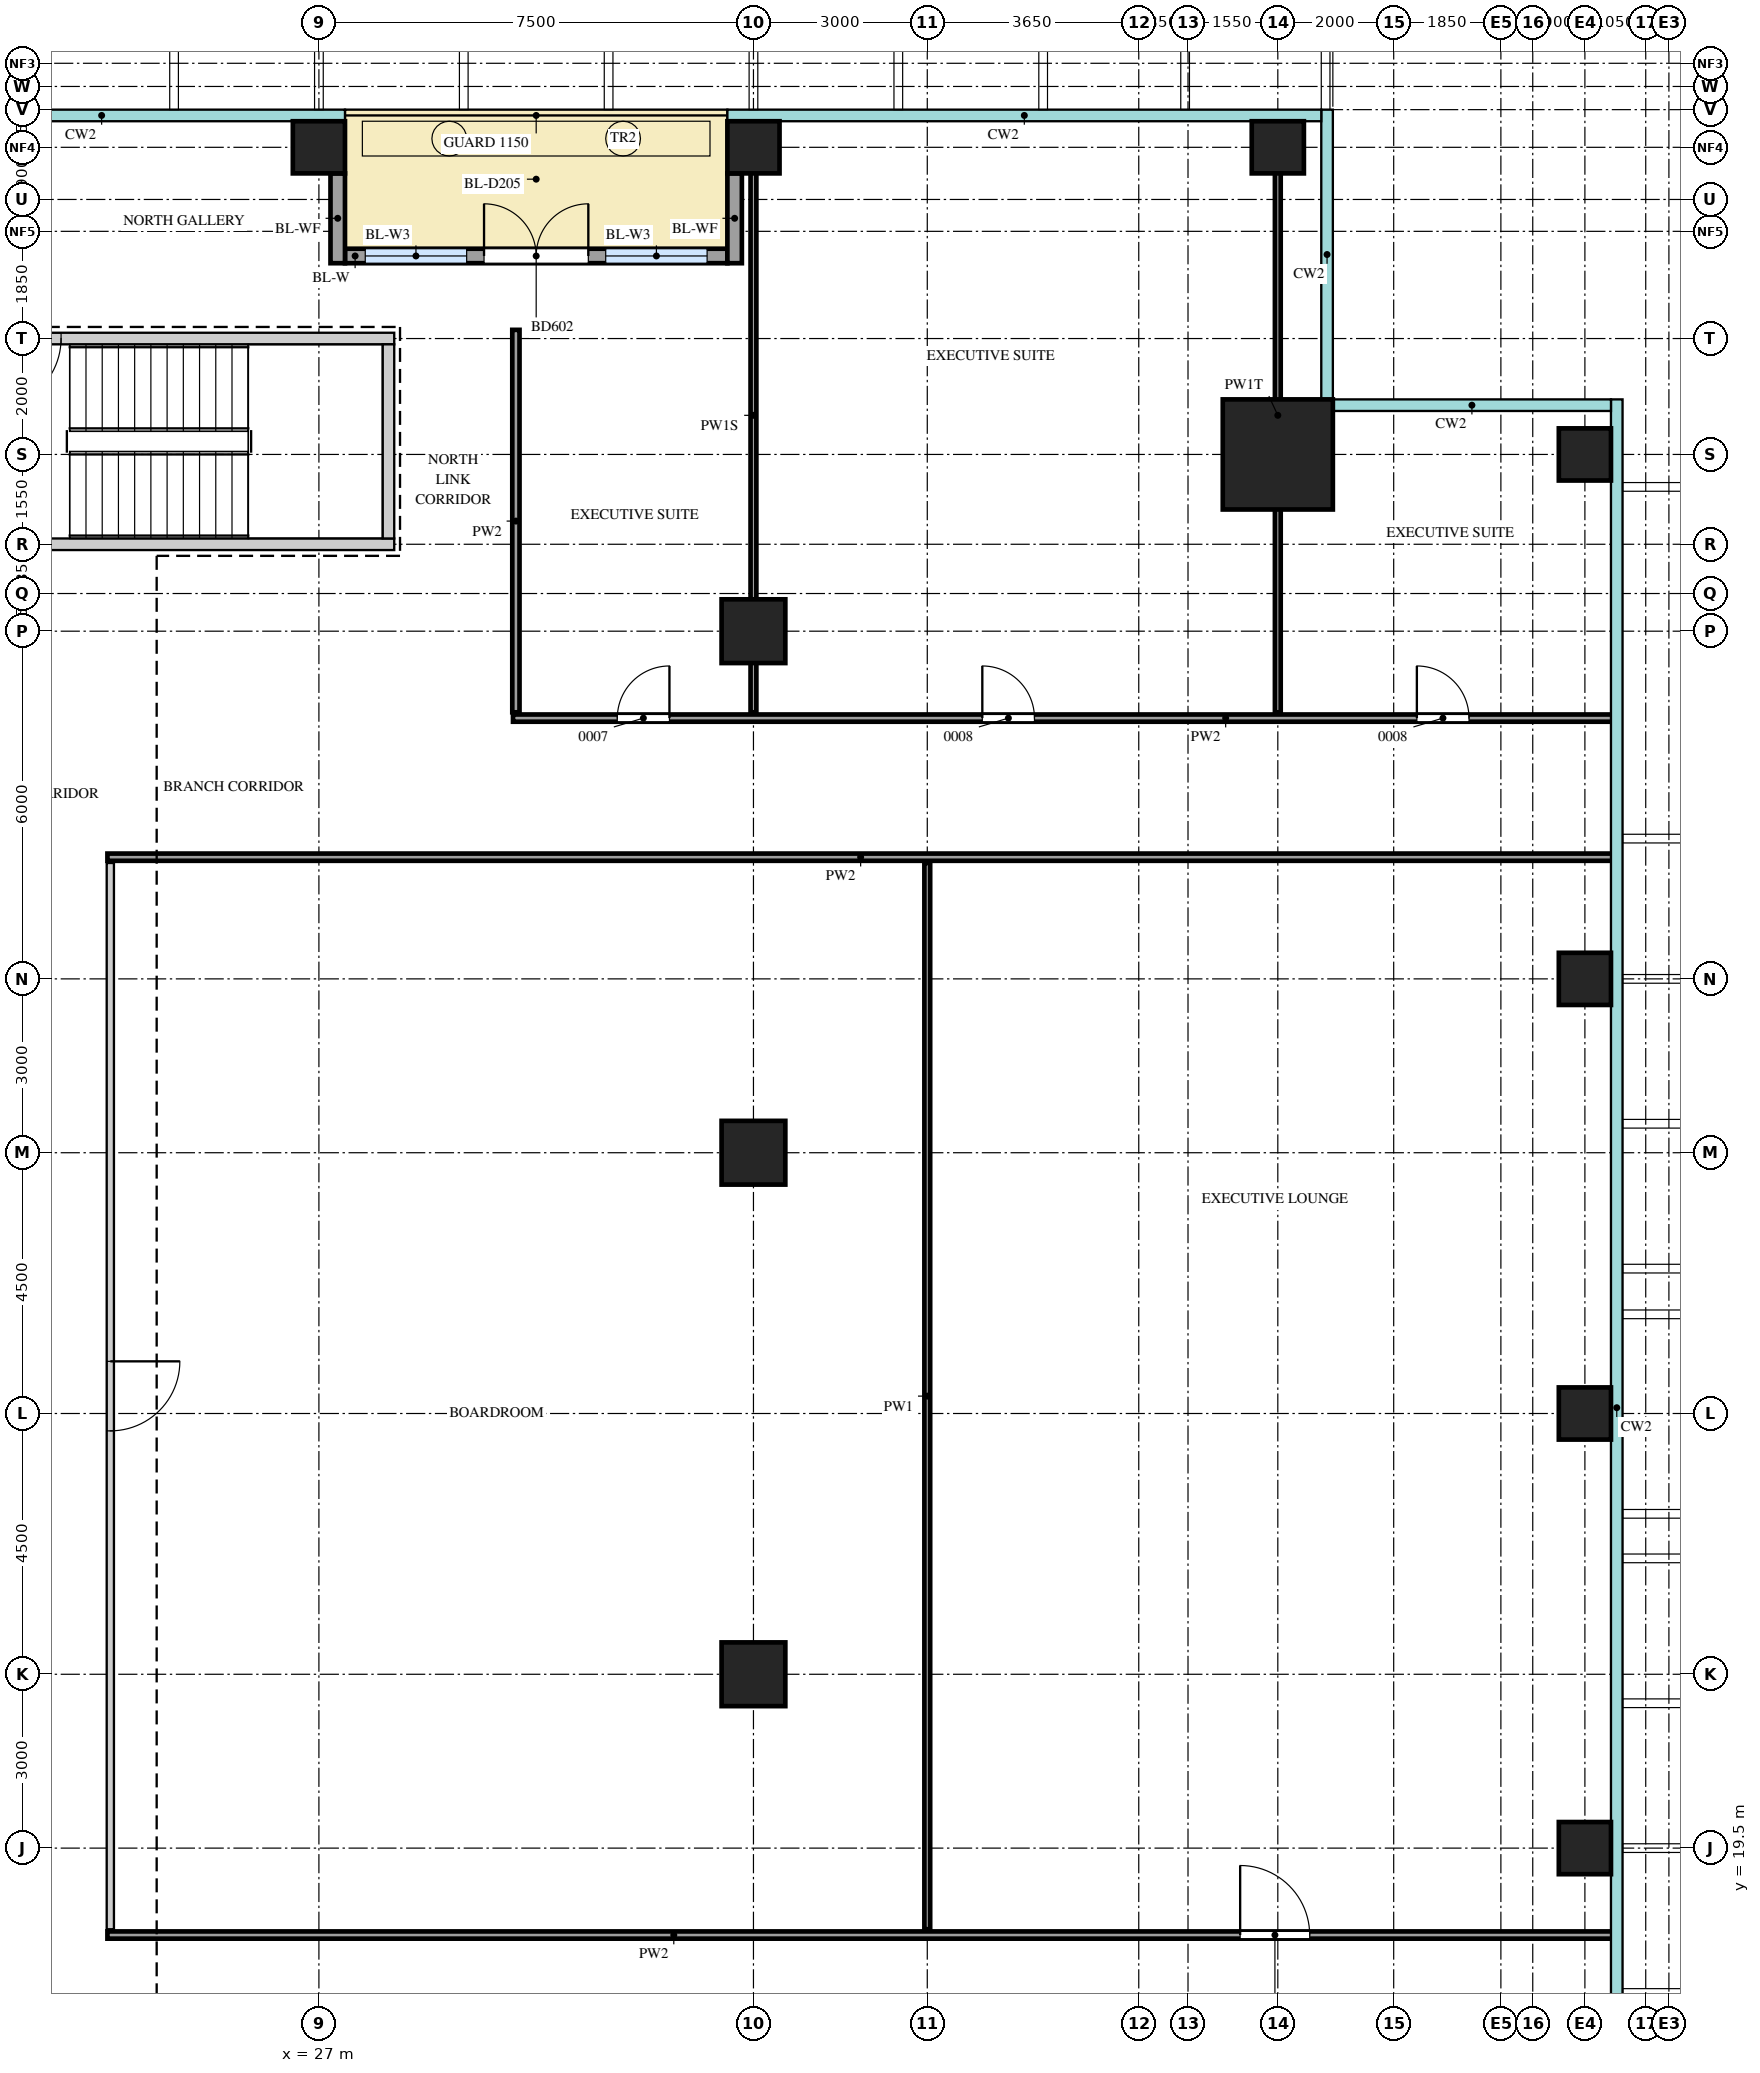
"""IFC4 building model, lengths in metres.
Left out: names, types, materials, properties, quantities, classifications, styles, units other than length and angle.
Written with IfcOpenShell. Run it as: python <this file> out.ifc"""

import sys

from ifc_helpers import new_model, si_unit, direction, frame, frame_2d, origin, origin_2d, place, context, subcontext, project, spatial, rectangle, extrude, source, transform, mapped, element, fill, save


model = new_model("IFC4")
c1 = context("Model", 3, precision=1e-05, world=origin(), true_north=direction((0.0, 1.0)))
c2 = subcontext(c1, "Body", "Model", "MODEL_VIEW")
j1 = project(units=[si_unit("LENGTHUNIT", "METRE"), si_unit("PLANEANGLEUNIT", "RADIAN")], contexts=[c1])
p1 = place(None, origin())
s1 = spatial("IfcSite", under=j1, at=p1, CompositionType="ELEMENT")
p2 = place(p1, origin())
s2 = spatial("IfcBuilding", under=s1, at=p2, CompositionType="ELEMENT")
p3 = place(p2, frame((0.0, 0.0, 266.2)))
s3 = spatial("IfcBuildingStorey", under=s2, at=p3, CompositionType="ELEMENT", Elevation=266.2)
m1 = source(origin(), c2, "Body", "SweptSolid", [
    extrude(rectangle(XDim=7.1, YDim=0.2, at=frame_2d((3.55, 0.0))), origin(), (0.0, 0.0, 1.0), 3.75),
])
p4 = place(p3, frame((21.2, 45.55, 0.0), z_axis=(0.0, 0.0, 1.0), x_axis=(1.0, 0.0, 0.0)))
e1 = element("IfcWall", 1, at=p4, inside=s3, PredefinedType="SHEAR", context=c2, shape_type="MappedRepresentation", body=[
    mapped(m1, transform((0.0, 0.0, 0.0))),
])
m2 = source(origin(), c2, "Body", "SweptSolid", [
    extrude(rectangle(XDim=1.2, YDim=2.1, at=frame_2d((0.6, 1.05))), frame((0.0, 0.11, 0.0), z_axis=(0.0, -1.0, 0.0), x_axis=(1.0, 0.0, 0.0)), (0.0, 0.0, 1.0), 0.22),
])
p5 = place(p4, frame((0.15, 0.0, 0.0)))
e2 = element("IfcOpeningElement", 2, at=p5, cuts=e1, PredefinedType="OPENING", context=c2, shape_type="MappedRepresentation", body=[
    mapped(m2, transform((0.0, 0.0, 0.0))),
])
p6 = place(p3, frame((21.2, 42.0, 0.0), z_axis=(0.0, 0.0, 1.0), x_axis=(1.0, 0.0, 0.0)))
e3 = element("IfcWall", 3, at=p6, inside=s3, PredefinedType="SHEAR", context=c2, shape_type="MappedRepresentation", body=[
    mapped(m1, transform((0.0, 0.0, 0.0))),
])
m3 = source(origin(), c2, "Body", "SweptSolid", [
    extrude(rectangle(XDim=3.35, YDim=0.2, at=frame_2d((1.675, 0.0))), origin(), (0.0, 0.0, 1.0), 3.75),
])
p7 = place(p3, frame((28.2, 42.1, 0.0), z_axis=(0.0, 0.0, 1.0), x_axis=(0.0, 1.0, 0.0)))
e4 = element("IfcWall", 4, at=p7, inside=s3, PredefinedType="SHEAR", context=c2, shape_type="MappedRepresentation", body=[
    mapped(m3, transform((0.0, 0.0, 0.0))),
])
m4 = source(origin(), c2, "Body", "SweptSolid", [
    extrude(rectangle(XDim=1.9, YDim=1.9, at=origin_2d()), origin(), (0.0, 0.0, 1.0), 4.0),
])
p8 = place(p3, frame((43.55, 43.55, 0.0), z_axis=(0.0, 0.0, 1.0), x_axis=(1.0, 0.0, 0.0)))
e5 = element("IfcColumn", 5, at=p8, inside=s3, PredefinedType="COLUMN", context=c2, shape_type="MappedRepresentation", body=[
    mapped(m4, transform((0.0, 0.0, 0.0))),
])
m5 = source(origin(), c2, "Body", "SweptSolid", [
    extrude(rectangle(XDim=0.9, YDim=0.9, at=origin_2d()), origin(), (0.0, 0.0, 1.0), 3.75),
])
for number, where, z_axis, x_axis in (
    (6, (48.85, 19.5, 0.0), (0.0, 0.0, 1.0), (1.0, 0.0, 0.0)),
    (7, (48.85, 27.0, 0.0), (0.0, 0.0, 1.0), (1.0, 0.0, 0.0)),
    (8, (48.85, 34.5, 0.0), (0.0, 0.0, 1.0), (1.0, 0.0, 0.0)),
    (9, (48.85, 43.55, 0.0), (0.0, 0.0, 1.0), (1.0, 0.0, 0.0)),
    (10, (27.0, 48.85, 0.0), (0.0, 0.0, 1.0), (1.0, 0.0, 0.0)),
    (11, (34.5, 48.85, 0.0), (0.0, 0.0, 1.0), (1.0, 0.0, 0.0)),
    (12, (43.55, 48.85, 0.0), (0.0, 0.0, 1.0), (1.0, 0.0, 0.0)),
):
    element("IfcColumn", number, at=place(p3, frame(where, z_axis=z_axis, x_axis=x_axis)), inside=s3, PredefinedType="COLUMN", context=c2, shape_type="MappedRepresentation", body=[
        mapped(m5, transform((0.0, 0.0, 0.0))),
    ])
m6 = source(origin(), c2, "Body", "SweptSolid", [
    extrude(rectangle(XDim=1.1, YDim=1.1, at=origin_2d()), origin(), (0.0, 0.0, 1.0), 3.75),
])
for number, where, z_axis, x_axis in (
    (13, (34.5, 22.5, 0.0), (0.0, 0.0, 1.0), (1.0, 0.0, 0.0)),
    (14, (34.5, 31.5, 0.0), (0.0, 0.0, 1.0), (1.0, 0.0, 0.0)),
    (15, (34.5, 40.5, 0.0), (0.0, 0.0, 1.0), (1.0, 0.0, 0.0)),
):
    element("IfcColumn", number, at=place(p3, frame(where, z_axis=z_axis, x_axis=x_axis)), inside=s3, PredefinedType="COLUMN", context=c2, shape_type="MappedRepresentation", body=[
        mapped(m6, transform((0.0, 0.0, 0.0))),
    ])
m7 = source(origin(), c2, "Body", "SweptSolid", [
    extrude(rectangle(XDim=6.6, YDim=0.25, at=frame_2d((3.3, 0.0))), origin(), (0.0, 0.0, 1.0), 3.75),
])
p9 = place(p3, frame((27.45, 46.975, 0.0), z_axis=(0.0, 0.0, 1.0), x_axis=(1.0, 0.0, 0.0)))
e16 = element("IfcWall", 16, at=p9, inside=s3, PredefinedType="SOLIDWALL", context=c2, shape_type="MappedRepresentation", body=[
    mapped(m7, transform((0.0, 0.0, 0.0))),
])
m8 = source(origin(), c2, "Body", "SweptSolid", [
    extrude(rectangle(XDim=1.75, YDim=2.4, at=frame_2d((0.875, 1.2))), frame((0.0, 0.135, 0.0), z_axis=(0.0, -1.0, 0.0), x_axis=(1.0, 0.0, 0.0)), (0.0, 0.0, 1.0), 0.27),
])
p10 = place(p9, frame((0.35, 0.0, 0.0)))
e17 = element("IfcOpeningElement", 17, at=p10, cuts=e16, PredefinedType="OPENING", context=c2, shape_type="MappedRepresentation", body=[
    mapped(m8, transform((0.0, 0.0, 0.0))),
])
p11 = place(p9, frame((4.5, 0.0, 0.0)))
e18 = element("IfcOpeningElement", 18, at=p11, cuts=e16, PredefinedType="OPENING", context=c2, shape_type="MappedRepresentation", body=[
    mapped(m8, transform((0.0, 0.0, 0.0))),
])
m9 = source(origin(), c2, "Body", "SweptSolid", [
    extrude(rectangle(XDim=1.8, YDim=2.4, at=frame_2d((0.9, 1.2))), frame((0.0, 0.135, 0.0), z_axis=(0.0, -1.0, 0.0), x_axis=(1.0, 0.0, 0.0)), (0.0, 0.0, 1.0), 0.27),
])
p12 = place(p9, frame((2.4, 0.0, 0.0)))
e19 = element("IfcOpeningElement", 19, at=p12, cuts=e16, PredefinedType="OPENING", context=c2, shape_type="MappedRepresentation", body=[
    mapped(m9, transform((0.0, 0.0, 0.0))),
])
m10 = source(origin(), c2, "Body", "SweptSolid", [
    extrude(rectangle(XDim=1.55, YDim=0.25, at=frame_2d((0.775, 0.0))), origin(), (0.0, 0.0, 1.0), 3.45),
])
for number, where, z_axis, x_axis in (
    (20, (27.325, 48.4, 0.0), (0.0, 0.0, 1.0), (0.0, -1.0, 0.0)),
    (21, (34.175, 48.4, 0.0), (0.0, 0.0, 1.0), (0.0, -1.0, 0.0)),
):
    element("IfcWall", number, at=place(p3, frame(where, z_axis=z_axis, x_axis=x_axis)), inside=s3, PredefinedType="SOLIDWALL", context=c2, shape_type="MappedRepresentation", body=[
        mapped(m10, transform((0.0, 0.0, 0.0))),
    ])
m11 = source(origin(), c2, "Body", "SweptSolid", [
    extrude(rectangle(XDim=26.0, YDim=0.125, at=frame_2d((13.0, 0.0))), origin(), (0.0, 0.0, 1.0), 3.8),
])
p13 = place(p3, frame((23.35, 18.0, 0.0), z_axis=(0.0, 0.0, 1.0), x_axis=(1.0, 0.0, 0.0)))
e22 = element("IfcWall", 22, at=p13, inside=s3, PredefinedType="PARTITIONING", context=c2, shape_type="MappedRepresentation", body=[
    mapped(m11, transform((0.0, 0.0, 0.0))),
])
m12 = source(origin(), c2, "Body", "SweptSolid", [
    extrude(rectangle(XDim=1.2, YDim=2.1, at=frame_2d((0.6, 1.05))), frame((0.0, 0.073, 0.0), z_axis=(0.0, -1.0, 0.0), x_axis=(1.0, 0.0, 0.0)), (0.0, 0.0, 1.0), 0.145),
])
p14 = place(p13, frame((19.55, 0.0, 0.0)))
e23 = element("IfcOpeningElement", 23, at=p14, cuts=e22, PredefinedType="OPENING", context=c2, shape_type="MappedRepresentation", body=[
    mapped(m12, transform((0.0, 0.0, 0.0))),
])
m13 = source(origin(), c2, "Body", "SweptSolid", [
    extrude(rectangle(XDim=18.4, YDim=0.125, at=frame_2d((9.2, 0.0))), origin(), (0.0, 0.0, 1.0), 3.8),
])
p15 = place(p3, frame((23.4, 18.1, 0.0), z_axis=(0.0, 0.0, 1.0), x_axis=(0.0, 1.0, 0.0)))
e24 = element("IfcWall", 24, at=p15, inside=s3, PredefinedType="PARTITIONING", context=c2, shape_type="MappedRepresentation", body=[
    mapped(m13, transform((0.0, 0.0, 0.0))),
])
p16 = place(p15, frame((8.6, 0.0, 0.0)))
e25 = element("IfcOpeningElement", 25, at=p16, cuts=e24, PredefinedType="OPENING", context=c2, shape_type="MappedRepresentation", body=[
    mapped(m12, transform((0.0, 0.0, 0.0))),
])
m14 = source(origin(), c2, "Body", "SweptSolid", [
    extrude(rectangle(XDim=18.4, YDim=0.1, at=frame_2d((9.2, 0.0))), origin(), (0.0, 0.0, 1.0), 3.8),
])
p17 = place(p3, frame((37.5, 18.1, 0.0), z_axis=(0.0, 0.0, 1.0), x_axis=(0.0, 1.0, 0.0)))
e26 = element("IfcWall", 26, at=p17, inside=s3, PredefinedType="PARTITIONING", context=c2, shape_type="MappedRepresentation", body=[
    mapped(m14, transform((0.0, 0.0, 0.0))),
])
p18 = place(p3, frame((23.35, 36.6, 0.0), z_axis=(0.0, 0.0, 1.0), x_axis=(1.0, 0.0, 0.0)))
e27 = element("IfcWall", 27, at=p18, inside=s3, PredefinedType="PARTITIONING", context=c2, shape_type="MappedRepresentation", body=[
    mapped(m11, transform((0.0, 0.0, 0.0))),
])
m15 = source(origin(), c2, "Body", "SweptSolid", [
    extrude(rectangle(XDim=19.0, YDim=0.125, at=frame_2d((9.5, 0.0))), origin(), (0.0, 0.0, 1.0), 3.8),
])
p19 = place(p3, frame((30.35, 39.0, 0.0), z_axis=(0.0, 0.0, 1.0), x_axis=(1.0, 0.0, 0.0)))
e28 = element("IfcWall", 28, at=p19, inside=s3, PredefinedType="PARTITIONING", context=c2, shape_type="MappedRepresentation", body=[
    mapped(m15, transform((0.0, 0.0, 0.0))),
])
m16 = source(origin(), c2, "Body", "SweptSolid", [
    extrude(rectangle(XDim=0.9, YDim=2.1, at=frame_2d((0.45, 1.05))), frame((0.0, 0.073, 0.0), z_axis=(0.0, -1.0, 0.0), x_axis=(1.0, 0.0, 0.0)), (0.0, 0.0, 1.0), 0.145),
])
p20 = place(p19, frame((1.8, 0.0, 0.0)))
e29 = element("IfcOpeningElement", 29, at=p20, cuts=e28, PredefinedType="OPENING", context=c2, shape_type="MappedRepresentation", body=[
    mapped(m16, transform((0.0, 0.0, 0.0))),
])
p21 = place(p19, frame((8.1, 0.0, 0.0)))
e30 = element("IfcOpeningElement", 30, at=p21, cuts=e28, PredefinedType="OPENING", context=c2, shape_type="MappedRepresentation", body=[
    mapped(m16, transform((0.0, 0.0, 0.0))),
])
p22 = place(p19, frame((15.6, 0.0, 0.0)))
e31 = element("IfcOpeningElement", 31, at=p22, cuts=e28, PredefinedType="OPENING", context=c2, shape_type="MappedRepresentation", body=[
    mapped(m16, transform((0.0, 0.0, 0.0))),
])
m17 = source(origin(), c2, "Body", "SweptSolid", [
    extrude(rectangle(XDim=6.6, YDim=0.125, at=frame_2d((3.3, 0.0))), origin(), (0.0, 0.0, 1.0), 3.8),
])
p23 = place(p3, frame((30.4, 39.1, 0.0), z_axis=(0.0, 0.0, 1.0), x_axis=(0.0, 1.0, 0.0)))
e32 = element("IfcWall", 32, at=p23, inside=s3, PredefinedType="PARTITIONING", context=c2, shape_type="MappedRepresentation", body=[
    mapped(m17, transform((0.0, 0.0, 0.0))),
])
m18 = source(origin(), c2, "Body", "SweptSolid", [
    extrude(rectangle(XDim=10.25, YDim=0.1, at=frame_2d((5.125, 0.0))), origin(), (0.0, 0.0, 1.0), 3.35),
])
p24 = place(p3, frame((34.5, 39.1, 0.0), z_axis=(0.0, 0.0, 1.0), x_axis=(0.0, 1.0, 0.0)))
e33 = element("IfcWall", 33, at=p24, inside=s3, PredefinedType="PARTITIONING", context=c2, shape_type="MappedRepresentation", body=[
    mapped(m18, transform((0.0, 0.0, 0.0))),
])
m19 = source(origin(), c2, "Body", "SweptSolid", [
    extrude(rectangle(XDim=10.25, YDim=0.1, at=frame_2d((5.125, 0.0))), origin(), (0.0, 0.0, 1.0), 3.3),
])
p25 = place(p3, frame((43.55, 39.1, 0.0), z_axis=(0.0, 0.0, 1.0), x_axis=(0.0, 1.0, 0.0)))
e34 = element("IfcWall", 34, at=p25, inside=s3, PredefinedType="PARTITIONING", context=c2, shape_type="MappedRepresentation", body=[
    mapped(m19, transform((0.0, 0.0, 0.0))),
])
m20 = source(origin(), c2, "Body", "SweptSolid", [
    extrude(rectangle(XDim=1.75, YDim=2.4, at=frame_2d((0.875, 1.2))), frame((0.0, 0.03, 0.0), z_axis=(0.0, -1.0, 0.0), x_axis=(1.0, 0.0, 0.0)), (0.0, 0.0, 1.0), 0.06),
])
p26 = place(p10, origin())
e35 = element("IfcWindow", 35, at=p26, inside=s3, PartitioningType="SINGLE_PANEL", PredefinedType="WINDOW", context=c2, shape_type="MappedRepresentation", body=[
    mapped(m20, transform((0.0, 0.0, 0.0))),
])
fill(e17, e35)
p27 = place(p11, origin())
e36 = element("IfcWindow", 36, at=p27, inside=s3, PartitioningType="SINGLE_PANEL", PredefinedType="WINDOW", context=c2, shape_type="MappedRepresentation", body=[
    mapped(m20, transform((0.0, 0.0, 0.0))),
])
fill(e18, e36)
m21 = source(origin(), c2, "Body", "SweptSolid", [
    extrude(rectangle(XDim=1.8, YDim=2.4, at=frame_2d((0.9, 1.2))), frame((0.0, 0.025, 0.0), z_axis=(0.0, -1.0, 0.0), x_axis=(1.0, 0.0, 0.0)), (0.0, 0.0, 1.0), 0.05),
])
p28 = place(p12, origin())
e37 = element("IfcDoor", 37, at=p28, inside=s3, OperationType="DOUBLE_DOOR_DOUBLE_SWING", PredefinedType="DOOR", context=c2, shape_type="MappedRepresentation", body=[
    mapped(m21, transform((0.0, 0.0, 0.0))),
])
fill(e19, e37)
m22 = source(origin(), c2, "Body", "SweptSolid", [
    extrude(rectangle(XDim=1.2, YDim=2.1, at=frame_2d((0.6, 1.05))), frame((0.0, 0.025, 0.0), z_axis=(0.0, -1.0, 0.0), x_axis=(1.0, 0.0, 0.0)), (0.0, 0.0, 1.0), 0.05),
])
p29 = place(p16, origin())
e38 = element("IfcDoor", 38, at=p29, inside=s3, OperationType="SINGLE_SWING_RIGHT", PredefinedType="DOOR", context=c2, shape_type="MappedRepresentation", body=[
    mapped(m22, transform((0.0, 0.0, 0.0))),
])
fill(e25, e38)
p30 = place(p14, origin())
e39 = element("IfcDoor", 39, at=p30, inside=s3, OperationType="SINGLE_SWING_RIGHT", PredefinedType="DOOR", context=c2, shape_type="MappedRepresentation", body=[
    mapped(m22, transform((0.0, 0.0, 0.0))),
])
fill(e23, e39)
m23 = source(origin(), c2, "Body", "SweptSolid", [
    extrude(rectangle(XDim=0.9, YDim=2.1, at=frame_2d((0.45, 1.05))), frame((0.0, 0.025, 0.0), z_axis=(0.0, -1.0, 0.0), x_axis=(1.0, 0.0, 0.0)), (0.0, 0.0, 1.0), 0.05),
])
p31 = place(p20, origin())
e40 = element("IfcDoor", 40, at=p31, inside=s3, OperationType="SINGLE_SWING_LEFT", PredefinedType="DOOR", context=c2, shape_type="MappedRepresentation", body=[
    mapped(m23, transform((0.0, 0.0, 0.0))),
])
fill(e29, e40)
p32 = place(p21, origin())
e41 = element("IfcDoor", 41, at=p32, inside=s3, OperationType="SINGLE_SWING_RIGHT", PredefinedType="DOOR", context=c2, shape_type="MappedRepresentation", body=[
    mapped(m23, transform((0.0, 0.0, 0.0))),
])
fill(e30, e41)
p33 = place(p22, origin())
e42 = element("IfcDoor", 42, at=p33, inside=s3, OperationType="SINGLE_SWING_RIGHT", PredefinedType="DOOR", context=c2, shape_type="MappedRepresentation", body=[
    mapped(m23, transform((0.0, 0.0, 0.0))),
])
fill(e31, e42)
p34 = place(p5, origin())
e43 = element("IfcDoor", 43, at=p34, inside=s3, OperationType="SINGLE_SWING_LEFT", PredefinedType="DOOR", context=c2, shape_type="MappedRepresentation", body=[
    mapped(m22, transform((0.0, 0.0, 0.0))),
])
fill(e2, e43)
save(model, sys.argv[1])
